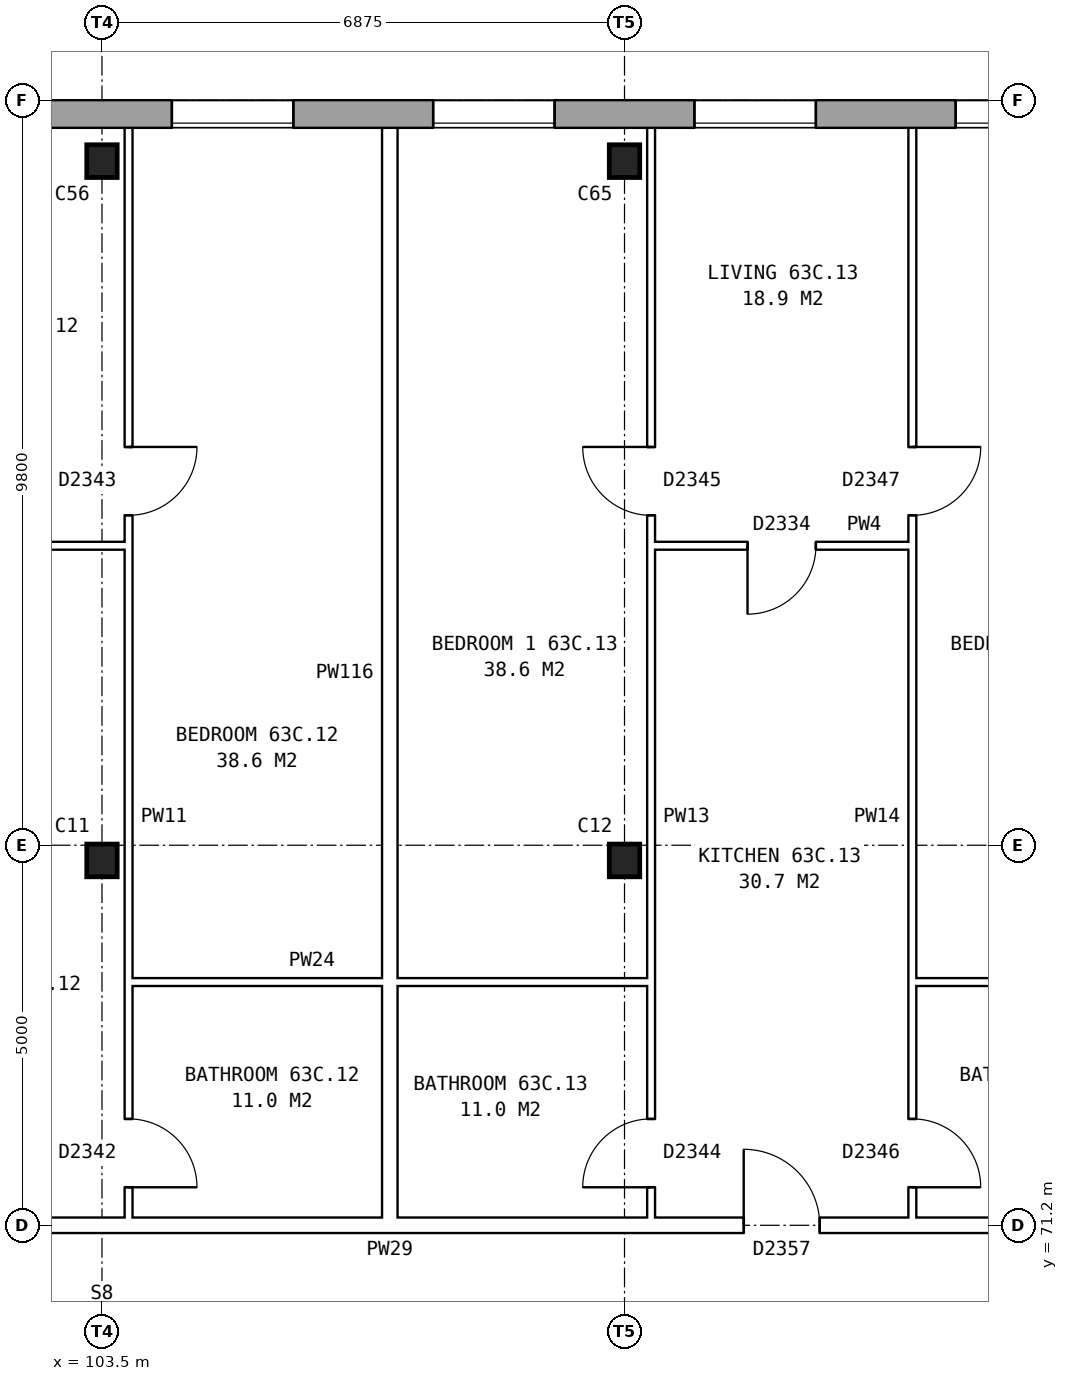
"""IFC4 building model, lengths in metres.
Left out: names, types, materials, properties, quantities, classifications, styles, units other than length and angle.
Written with IfcOpenShell. Run it as: python <this file> out.ifc"""

import sys

from ifc_helpers import new_model, si_unit, direction, frame, frame_2d, origin, origin_2d, place, context, subcontext, project, spatial, rectangle, i_section, extrude, element, fill, save


model = new_model("IFC4")
c1 = context("Model", 3, precision=1e-05, world=origin(), true_north=direction((0.0, 1.0)))
c2 = subcontext(c1, "Body", "Model", "MODEL_VIEW")
j1 = project(units=[si_unit("LENGTHUNIT", "METRE"), si_unit("PLANEANGLEUNIT", "RADIAN")], contexts=[c1])
p1 = place(None, origin())
s1 = spatial("IfcSite", under=j1, at=p1, CompositionType="ELEMENT")
p2 = place(p1, origin())
s2 = spatial("IfcBuilding", under=s1, at=p2, CompositionType="ELEMENT")
p3 = place(p2, frame((0.0, 0.0, 224.5)))
s3 = spatial("IfcBuildingStorey", under=s2, at=p3, CompositionType="ELEMENT", Elevation=224.5)
for number, where, z_axis, x_axis in (
    (1, (103.5, 76.0, 0.0), (0.0, 0.0, 1.0), (1.0, 0.0, 0.0)),
    (2, (110.375, 76.0, 0.0), (0.0, 0.0, 1.0), (1.0, 0.0, 0.0)),
    (3, (103.5, 85.2, 0.0), (0.0, 0.0, 1.0), (1.0, 0.0, 0.0)),
    (4, (110.375, 85.2, 0.0), (0.0, 0.0, 1.0), (1.0, 0.0, 0.0)),
):
    element("IfcColumn", number, at=place(p3, frame(where, z_axis=z_axis, x_axis=x_axis)), inside=s3, PredefinedType="COLUMN", context=c2, shape_type="SweptSolid", body=[
        extrude(i_section(OverallWidth=0.4, OverallDepth=0.43, WebThickness=0.04, FlangeThickness=0.04, at=origin_2d()), origin(), (0.0, 0.0, 1.0), 2.85),
    ])
p4 = place(p3, frame((131.05, 85.82, 0.0), z_axis=(0.0, 0.0, 1.0), x_axis=(-1.0, 0.0, 0.0)))
e5 = element("IfcWall", 5, at=p4, inside=s3, PredefinedType="STANDARD", context=c2, shape_type="SweptSolid", body=[
    extrude(rectangle(XDim=55.1, YDim=0.36, at=frame_2d((27.55, 0.0))), origin(), (0.0, 0.0, 1.0), 2.85),
])
p5 = place(p4, frame((0.969, 0.0, 0.8)))
e6 = element("IfcOpeningElement", 6, at=p5, cuts=e5, PredefinedType="OPENING", context=c2, shape_type="SweptSolid", body=[
    extrude(rectangle(XDim=1.6, YDim=1.8, at=frame_2d((0.8, 0.9))), frame((0.0, 0.19, 0.0), z_axis=(0.0, -1.0, 0.0), x_axis=(1.0, 0.0, 0.0)), (0.0, 0.0, 1.0), 0.38),
])
p6 = place(p4, frame((4.406, 0.0, 0.8)))
e7 = element("IfcOpeningElement", 7, at=p6, cuts=e5, PredefinedType="OPENING", context=c2, shape_type="SweptSolid", body=[
    extrude(rectangle(XDim=1.6, YDim=1.8, at=frame_2d((0.8, 0.9))), frame((0.0, 0.19, 0.0), z_axis=(0.0, -1.0, 0.0), x_axis=(1.0, 0.0, 0.0)), (0.0, 0.0, 1.0), 0.38),
])
p7 = place(p4, frame((7.844, 0.0, 0.8)))
e8 = element("IfcOpeningElement", 8, at=p7, cuts=e5, PredefinedType="OPENING", context=c2, shape_type="SweptSolid", body=[
    extrude(rectangle(XDim=1.6, YDim=1.8, at=frame_2d((0.8, 0.9))), frame((0.0, 0.19, 0.0), z_axis=(0.0, -1.0, 0.0), x_axis=(1.0, 0.0, 0.0)), (0.0, 0.0, 1.0), 0.38),
])
p8 = place(p4, frame((11.281, 0.0, 0.8)))
e9 = element("IfcOpeningElement", 9, at=p8, cuts=e5, PredefinedType="OPENING", context=c2, shape_type="SweptSolid", body=[
    extrude(rectangle(XDim=1.6, YDim=1.8, at=frame_2d((0.8, 0.9))), frame((0.0, 0.19, 0.0), z_axis=(0.0, -1.0, 0.0), x_axis=(1.0, 0.0, 0.0)), (0.0, 0.0, 1.0), 0.38),
])
p9 = place(p4, frame((14.719, 0.0, 0.8)))
e10 = element("IfcOpeningElement", 10, at=p9, cuts=e5, PredefinedType="OPENING", context=c2, shape_type="SweptSolid", body=[
    extrude(rectangle(XDim=1.6, YDim=1.8, at=frame_2d((0.8, 0.9))), frame((0.0, 0.19, 0.0), z_axis=(0.0, -1.0, 0.0), x_axis=(1.0, 0.0, 0.0)), (0.0, 0.0, 1.0), 0.38),
])
p10 = place(p4, frame((18.156, 0.0, 0.8)))
e11 = element("IfcOpeningElement", 11, at=p10, cuts=e5, PredefinedType="OPENING", context=c2, shape_type="SweptSolid", body=[
    extrude(rectangle(XDim=1.6, YDim=1.8, at=frame_2d((0.8, 0.9))), frame((0.0, 0.19, 0.0), z_axis=(0.0, -1.0, 0.0), x_axis=(1.0, 0.0, 0.0)), (0.0, 0.0, 1.0), 0.38),
])
p11 = place(p4, frame((21.594, 0.0, 0.8)))
e12 = element("IfcOpeningElement", 12, at=p11, cuts=e5, PredefinedType="OPENING", context=c2, shape_type="SweptSolid", body=[
    extrude(rectangle(XDim=1.6, YDim=1.8, at=frame_2d((0.8, 0.9))), frame((0.0, 0.19, 0.0), z_axis=(0.0, -1.0, 0.0), x_axis=(1.0, 0.0, 0.0)), (0.0, 0.0, 1.0), 0.38),
])
p12 = place(p4, frame((25.031, 0.0, 0.8)))
e13 = element("IfcOpeningElement", 13, at=p12, cuts=e5, PredefinedType="OPENING", context=c2, shape_type="SweptSolid", body=[
    extrude(rectangle(XDim=1.6, YDim=1.8, at=frame_2d((0.8, 0.9))), frame((0.0, 0.19, 0.0), z_axis=(0.0, -1.0, 0.0), x_axis=(1.0, 0.0, 0.0)), (0.0, 0.0, 1.0), 0.38),
])
p13 = place(p4, frame((28.469, 0.0, 0.8)))
e14 = element("IfcOpeningElement", 14, at=p13, cuts=e5, PredefinedType="OPENING", context=c2, shape_type="SweptSolid", body=[
    extrude(rectangle(XDim=1.6, YDim=1.8, at=frame_2d((0.8, 0.9))), frame((0.0, 0.19, 0.0), z_axis=(0.0, -1.0, 0.0), x_axis=(1.0, 0.0, 0.0)), (0.0, 0.0, 1.0), 0.38),
])
p14 = place(p4, frame((31.906, 0.0, 0.8)))
e15 = element("IfcOpeningElement", 15, at=p14, cuts=e5, PredefinedType="OPENING", context=c2, shape_type="SweptSolid", body=[
    extrude(rectangle(XDim=1.6, YDim=1.8, at=frame_2d((0.8, 0.9))), frame((0.0, 0.19, 0.0), z_axis=(0.0, -1.0, 0.0), x_axis=(1.0, 0.0, 0.0)), (0.0, 0.0, 1.0), 0.38),
])
p15 = place(p4, frame((35.344, 0.0, 0.8)))
e16 = element("IfcOpeningElement", 16, at=p15, cuts=e5, PredefinedType="OPENING", context=c2, shape_type="SweptSolid", body=[
    extrude(rectangle(XDim=1.6, YDim=1.8, at=frame_2d((0.8, 0.9))), frame((0.0, 0.19, 0.0), z_axis=(0.0, -1.0, 0.0), x_axis=(1.0, 0.0, 0.0)), (0.0, 0.0, 1.0), 0.38),
])
p16 = place(p4, frame((38.781, 0.0, 0.8)))
e17 = element("IfcOpeningElement", 17, at=p16, cuts=e5, PredefinedType="OPENING", context=c2, shape_type="SweptSolid", body=[
    extrude(rectangle(XDim=1.6, YDim=1.8, at=frame_2d((0.8, 0.9))), frame((0.0, 0.19, 0.0), z_axis=(0.0, -1.0, 0.0), x_axis=(1.0, 0.0, 0.0)), (0.0, 0.0, 1.0), 0.38),
])
p17 = place(p4, frame((42.219, 0.0, 0.8)))
e18 = element("IfcOpeningElement", 18, at=p17, cuts=e5, PredefinedType="OPENING", context=c2, shape_type="SweptSolid", body=[
    extrude(rectangle(XDim=1.6, YDim=1.8, at=frame_2d((0.8, 0.9))), frame((0.0, 0.19, 0.0), z_axis=(0.0, -1.0, 0.0), x_axis=(1.0, 0.0, 0.0)), (0.0, 0.0, 1.0), 0.38),
])
p18 = place(p4, frame((45.656, 0.0, 0.8)))
e19 = element("IfcOpeningElement", 19, at=p18, cuts=e5, PredefinedType="OPENING", context=c2, shape_type="SweptSolid", body=[
    extrude(rectangle(XDim=1.6, YDim=1.8, at=frame_2d((0.8, 0.9))), frame((0.0, 0.19, 0.0), z_axis=(0.0, -1.0, 0.0), x_axis=(1.0, 0.0, 0.0)), (0.0, 0.0, 1.0), 0.38),
])
p19 = place(p4, frame((49.094, 0.0, 0.8)))
e20 = element("IfcOpeningElement", 20, at=p19, cuts=e5, PredefinedType="OPENING", context=c2, shape_type="SweptSolid", body=[
    extrude(rectangle(XDim=1.6, YDim=1.8, at=frame_2d((0.8, 0.9))), frame((0.0, 0.19, 0.0), z_axis=(0.0, -1.0, 0.0), x_axis=(1.0, 0.0, 0.0)), (0.0, 0.0, 1.0), 0.38),
])
p20 = place(p4, frame((52.531, 0.0, 0.8)))
e21 = element("IfcOpeningElement", 21, at=p20, cuts=e5, PredefinedType="OPENING", context=c2, shape_type="SweptSolid", body=[
    extrude(rectangle(XDim=1.6, YDim=1.8, at=frame_2d((0.8, 0.9))), frame((0.0, 0.19, 0.0), z_axis=(0.0, -1.0, 0.0), x_axis=(1.0, 0.0, 0.0)), (0.0, 0.0, 1.0), 0.38),
])
p21 = place(p3, frame((83.225, 71.2, 0.0), z_axis=(0.0, 0.0, 1.0), x_axis=(1.0, 0.0, 0.0)))
e22 = element("IfcWall", 22, at=p21, inside=s3, PredefinedType="PARTITIONING", context=c2, shape_type="SweptSolid", body=[
    extrude(rectangle(XDim=41.25, YDim=0.2, at=frame_2d((20.625, 0.0))), origin(), (0.0, 0.0, 1.0), 2.85),
])
p22 = place(p21, frame((4.656, 0.0, 0.0)))
e23 = element("IfcOpeningElement", 23, at=p22, cuts=e22, PredefinedType="OPENING", context=c2, shape_type="SweptSolid", body=[
    extrude(rectangle(XDim=1.0, YDim=2.1, at=frame_2d((0.5, 1.05))), frame((0.0, 0.11, 0.0), z_axis=(0.0, -1.0, 0.0), x_axis=(1.0, 0.0, 0.0)), (0.0, 0.0, 1.0), 0.22),
])
p23 = place(p21, frame((11.531, 0.0, 0.0)))
e24 = element("IfcOpeningElement", 24, at=p23, cuts=e22, PredefinedType="OPENING", context=c2, shape_type="SweptSolid", body=[
    extrude(rectangle(XDim=1.0, YDim=2.1, at=frame_2d((0.5, 1.05))), frame((0.0, 0.11, 0.0), z_axis=(0.0, -1.0, 0.0), x_axis=(1.0, 0.0, 0.0)), (0.0, 0.0, 1.0), 0.22),
])
p24 = place(p21, frame((18.406, 0.0, 0.0)))
e25 = element("IfcOpeningElement", 25, at=p24, cuts=e22, PredefinedType="OPENING", context=c2, shape_type="SweptSolid", body=[
    extrude(rectangle(XDim=1.0, YDim=2.1, at=frame_2d((0.5, 1.05))), frame((0.0, 0.11, 0.0), z_axis=(0.0, -1.0, 0.0), x_axis=(1.0, 0.0, 0.0)), (0.0, 0.0, 1.0), 0.22),
])
p25 = place(p21, frame((28.719, 0.0, 0.0)))
e26 = element("IfcOpeningElement", 26, at=p25, cuts=e22, PredefinedType="OPENING", context=c2, shape_type="SweptSolid", body=[
    extrude(rectangle(XDim=1.0, YDim=2.1, at=frame_2d((0.5, 1.05))), frame((0.0, 0.11, 0.0), z_axis=(0.0, -1.0, 0.0), x_axis=(1.0, 0.0, 0.0)), (0.0, 0.0, 1.0), 0.22),
])
p26 = place(p21, frame((35.594, 0.0, 0.0)))
e27 = element("IfcOpeningElement", 27, at=p26, cuts=e22, PredefinedType="OPENING", context=c2, shape_type="SweptSolid", body=[
    extrude(rectangle(XDim=1.0, YDim=2.1, at=frame_2d((0.5, 1.05))), frame((0.0, 0.11, 0.0), z_axis=(0.0, -1.0, 0.0), x_axis=(1.0, 0.0, 0.0)), (0.0, 0.0, 1.0), 0.22),
])
p27 = place(p3, frame((103.85, 74.4, 0.0), z_axis=(0.0, 0.0, 1.0), x_axis=(1.0, 0.0, 0.0)))
e28 = element("IfcWall", 28, at=p27, inside=s3, PredefinedType="PARTITIONING", context=c2, shape_type="SweptSolid", body=[
    extrude(rectangle(XDim=6.875, YDim=0.1, at=frame_2d((3.438, 0.0))), origin(), (0.0, 0.0, 1.0), 2.85),
])
p28 = place(p3, frame((114.162, 74.4, 0.0), z_axis=(0.0, 0.0, 1.0), x_axis=(1.0, 0.0, 0.0)))
e29 = element("IfcWall", 29, at=p28, inside=s3, PredefinedType="PARTITIONING", context=c2, shape_type="SweptSolid", body=[
    extrude(rectangle(XDim=3.338, YDim=0.1, at=frame_2d((1.669, 0.0))), origin(), (0.0, 0.0, 1.0), 2.85),
])
p29 = place(p3, frame((100.512, 80.14, 0.0), z_axis=(0.0, 0.0, 1.0), x_axis=(1.0, 0.0, 0.0)))
e30 = element("IfcWall", 30, at=p29, inside=s3, PredefinedType="PARTITIONING", context=c2, shape_type="SweptSolid", body=[
    extrude(rectangle(XDim=3.338, YDim=0.1, at=frame_2d((1.669, 0.0))), origin(), (0.0, 0.0, 1.0), 2.85),
])
p30 = place(p29, frame((1.219, 0.0, 0.0)))
e31 = element("IfcOpeningElement", 31, at=p30, cuts=e30, PredefinedType="OPENING", context=c2, shape_type="SweptSolid", body=[
    extrude(rectangle(XDim=0.9, YDim=2.1, at=frame_2d((0.45, 1.05))), frame((0.0, 0.06, 0.0), z_axis=(0.0, -1.0, 0.0), x_axis=(1.0, 0.0, 0.0)), (0.0, 0.0, 1.0), 0.12),
])
p31 = place(p3, frame((110.725, 80.14, 0.0), z_axis=(0.0, 0.0, 1.0), x_axis=(1.0, 0.0, 0.0)))
e32 = element("IfcWall", 32, at=p31, inside=s3, PredefinedType="PARTITIONING", context=c2, shape_type="SweptSolid", body=[
    extrude(rectangle(XDim=3.437, YDim=0.1, at=frame_2d((1.719, 0.0))), origin(), (0.0, 0.0, 1.0), 2.85),
])
p32 = place(p31, frame((1.269, 0.0, 0.0)))
e33 = element("IfcOpeningElement", 33, at=p32, cuts=e32, PredefinedType="OPENING", context=c2, shape_type="SweptSolid", body=[
    extrude(rectangle(XDim=0.9, YDim=2.1, at=frame_2d((0.45, 1.05))), frame((0.0, 0.06, 0.0), z_axis=(0.0, -1.0, 0.0), x_axis=(1.0, 0.0, 0.0)), (0.0, 0.0, 1.0), 0.12),
])
p33 = place(p3, frame((103.85, 71.3, 0.0), z_axis=(0.0, 0.0, 1.0), x_axis=(0.0, 1.0, 0.0)))
e34 = element("IfcWall", 34, at=p33, inside=s3, PredefinedType="PARTITIONING", context=c2, shape_type="SweptSolid", body=[
    extrude(rectangle(XDim=14.34, YDim=0.1, at=frame_2d((7.17, 0.0))), origin(), (0.0, 0.0, 1.0), 2.85),
])
p34 = place(p33, frame((9.24, 0.0, 0.0)))
e35 = element("IfcOpeningElement", 35, at=p34, cuts=e34, PredefinedType="OPENING", context=c2, shape_type="SweptSolid", body=[
    extrude(rectangle(XDim=0.9, YDim=2.1, at=frame_2d((0.45, 1.05))), frame((0.0, 0.06, 0.0), z_axis=(0.0, -1.0, 0.0), x_axis=(1.0, 0.0, 0.0)), (0.0, 0.0, 1.0), 0.12),
])
p35 = place(p33, frame((0.4, 0.0, 0.0)))
e36 = element("IfcOpeningElement", 36, at=p35, cuts=e34, PredefinedType="OPENING", context=c2, shape_type="SweptSolid", body=[
    extrude(rectangle(XDim=0.9, YDim=2.1, at=frame_2d((0.45, 1.05))), frame((0.0, 0.06, 0.0), z_axis=(0.0, -1.0, 0.0), x_axis=(1.0, 0.0, 0.0)), (0.0, 0.0, 1.0), 0.12),
])
p36 = place(p3, frame((107.287, 71.3, 0.0), z_axis=(0.0, 0.0, 1.0), x_axis=(0.0, 1.0, 0.0)))
e37 = element("IfcWall", 37, at=p36, inside=s3, PredefinedType="PARTITIONING", context=c2, shape_type="SweptSolid", body=[
    extrude(rectangle(XDim=14.34, YDim=0.2, at=frame_2d((7.17, 0.0))), origin(), (0.0, 0.0, 1.0), 2.85),
])
p37 = place(p3, frame((110.725, 71.3, 0.0), z_axis=(0.0, 0.0, 1.0), x_axis=(0.0, 1.0, 0.0)))
e38 = element("IfcWall", 38, at=p37, inside=s3, PredefinedType="PARTITIONING", context=c2, shape_type="SweptSolid", body=[
    extrude(rectangle(XDim=14.34, YDim=0.1, at=frame_2d((7.17, 0.0))), origin(), (0.0, 0.0, 1.0), 2.85),
])
p38 = place(p37, frame((9.24, 0.0, 0.0)))
e39 = element("IfcOpeningElement", 39, at=p38, cuts=e38, PredefinedType="OPENING", context=c2, shape_type="SweptSolid", body=[
    extrude(rectangle(XDim=0.9, YDim=2.1, at=frame_2d((0.45, 1.05))), frame((0.0, 0.06, 0.0), z_axis=(0.0, -1.0, 0.0), x_axis=(1.0, 0.0, 0.0)), (0.0, 0.0, 1.0), 0.12),
])
p39 = place(p37, frame((0.4, 0.0, 0.0)))
e40 = element("IfcOpeningElement", 40, at=p39, cuts=e38, PredefinedType="OPENING", context=c2, shape_type="SweptSolid", body=[
    extrude(rectangle(XDim=0.9, YDim=2.1, at=frame_2d((0.45, 1.05))), frame((0.0, 0.06, 0.0), z_axis=(0.0, -1.0, 0.0), x_axis=(1.0, 0.0, 0.0)), (0.0, 0.0, 1.0), 0.12),
])
p40 = place(p3, frame((114.162, 71.3, 0.0), z_axis=(0.0, 0.0, 1.0), x_axis=(0.0, 1.0, 0.0)))
e41 = element("IfcWall", 41, at=p40, inside=s3, PredefinedType="PARTITIONING", context=c2, shape_type="SweptSolid", body=[
    extrude(rectangle(XDim=14.34, YDim=0.1, at=frame_2d((7.17, 0.0))), origin(), (0.0, 0.0, 1.0), 2.85),
])
p41 = place(p40, frame((9.24, 0.0, 0.0)))
e42 = element("IfcOpeningElement", 42, at=p41, cuts=e41, PredefinedType="OPENING", context=c2, shape_type="SweptSolid", body=[
    extrude(rectangle(XDim=0.9, YDim=2.1, at=frame_2d((0.45, 1.05))), frame((0.0, 0.06, 0.0), z_axis=(0.0, -1.0, 0.0), x_axis=(1.0, 0.0, 0.0)), (0.0, 0.0, 1.0), 0.12),
])
p42 = place(p40, frame((0.4, 0.0, 0.0)))
e43 = element("IfcOpeningElement", 43, at=p42, cuts=e41, PredefinedType="OPENING", context=c2, shape_type="SweptSolid", body=[
    extrude(rectangle(XDim=0.9, YDim=2.1, at=frame_2d((0.45, 1.05))), frame((0.0, 0.06, 0.0), z_axis=(0.0, -1.0, 0.0), x_axis=(1.0, 0.0, 0.0)), (0.0, 0.0, 1.0), 0.12),
])
p43 = place(p9, origin())
e44 = element("IfcWindow", 44, at=p43, inside=s3, PartitioningType="SINGLE_PANEL", PredefinedType="WINDOW", context=c2, shape_type="SweptSolid", body=[
    extrude(rectangle(XDim=1.6, YDim=1.8, at=frame_2d((0.8, 0.9))), frame((0.0, 0.15, 0.0), z_axis=(0.0, -1.0, 0.0), x_axis=(1.0, 0.0, 0.0)), (0.0, 0.0, 1.0), 0.06),
])
fill(e10, e44)
p44 = place(p10, origin())
e45 = element("IfcWindow", 45, at=p44, inside=s3, PartitioningType="SINGLE_PANEL", PredefinedType="WINDOW", context=c2, shape_type="SweptSolid", body=[
    extrude(rectangle(XDim=1.6, YDim=1.8, at=frame_2d((0.8, 0.9))), frame((0.0, 0.15, 0.0), z_axis=(0.0, -1.0, 0.0), x_axis=(1.0, 0.0, 0.0)), (0.0, 0.0, 1.0), 0.06),
])
fill(e11, e45)
p45 = place(p11, origin())
e46 = element("IfcWindow", 46, at=p45, inside=s3, PartitioningType="SINGLE_PANEL", PredefinedType="WINDOW", context=c2, shape_type="SweptSolid", body=[
    extrude(rectangle(XDim=1.6, YDim=1.8, at=frame_2d((0.8, 0.9))), frame((0.0, 0.15, 0.0), z_axis=(0.0, -1.0, 0.0), x_axis=(1.0, 0.0, 0.0)), (0.0, 0.0, 1.0), 0.06),
])
fill(e12, e46)
p46 = place(p12, origin())
e47 = element("IfcWindow", 47, at=p46, inside=s3, PartitioningType="SINGLE_PANEL", PredefinedType="WINDOW", context=c2, shape_type="SweptSolid", body=[
    extrude(rectangle(XDim=1.6, YDim=1.8, at=frame_2d((0.8, 0.9))), frame((0.0, 0.15, 0.0), z_axis=(0.0, -1.0, 0.0), x_axis=(1.0, 0.0, 0.0)), (0.0, 0.0, 1.0), 0.06),
])
fill(e13, e47)
p47 = place(p34, frame((0.9, 0.0, 0.0), z_axis=(0.0, 0.0, 1.0), x_axis=(-1.0, 0.0, 0.0)))
e48 = element("IfcDoor", 48, at=p47, inside=s3, OperationType="SINGLE_SWING_LEFT", PredefinedType="DOOR", context=c2, shape_type="SweptSolid", body=[
    extrude(rectangle(XDim=0.9, YDim=2.1, at=frame_2d((0.45, 1.05))), frame((0.0, 0.025, 0.0), z_axis=(0.0, -1.0, 0.0), x_axis=(1.0, 0.0, 0.0)), (0.0, 0.0, 1.0), 0.05),
])
fill(e35, e48)
p48 = place(p35, frame((0.9, 0.0, 0.0), z_axis=(0.0, 0.0, 1.0), x_axis=(-1.0, 0.0, 0.0)))
e49 = element("IfcDoor", 49, at=p48, inside=s3, OperationType="SINGLE_SWING_RIGHT", PredefinedType="DOOR", context=c2, shape_type="SweptSolid", body=[
    extrude(rectangle(XDim=0.9, YDim=2.1, at=frame_2d((0.45, 1.05))), frame((0.0, 0.025, 0.0), z_axis=(0.0, -1.0, 0.0), x_axis=(1.0, 0.0, 0.0)), (0.0, 0.0, 1.0), 0.05),
])
fill(e36, e49)
p49 = place(p38, origin())
e50 = element("IfcDoor", 50, at=p49, inside=s3, OperationType="SINGLE_SWING_RIGHT", PredefinedType="DOOR", context=c2, shape_type="SweptSolid", body=[
    extrude(rectangle(XDim=0.9, YDim=2.1, at=frame_2d((0.45, 1.05))), frame((0.0, 0.025, 0.0), z_axis=(0.0, -1.0, 0.0), x_axis=(1.0, 0.0, 0.0)), (0.0, 0.0, 1.0), 0.05),
])
fill(e39, e50)
p50 = place(p41, frame((0.9, 0.0, 0.0), z_axis=(0.0, 0.0, 1.0), x_axis=(-1.0, 0.0, 0.0)))
e51 = element("IfcDoor", 51, at=p50, inside=s3, OperationType="SINGLE_SWING_LEFT", PredefinedType="DOOR", context=c2, shape_type="SweptSolid", body=[
    extrude(rectangle(XDim=0.9, YDim=2.1, at=frame_2d((0.45, 1.05))), frame((0.0, 0.025, 0.0), z_axis=(0.0, -1.0, 0.0), x_axis=(1.0, 0.0, 0.0)), (0.0, 0.0, 1.0), 0.05),
])
fill(e42, e51)
p51 = place(p25, origin())
e52 = element("IfcDoor", 52, at=p51, inside=s3, OperationType="SINGLE_SWING_LEFT", PredefinedType="DOOR", context=c2, shape_type="SweptSolid", body=[
    extrude(rectangle(XDim=1.0, YDim=2.1, at=frame_2d((0.5, 1.05))), frame((0.0, 0.025, 0.0), z_axis=(0.0, -1.0, 0.0), x_axis=(1.0, 0.0, 0.0)), (0.0, 0.0, 1.0), 0.05),
])
fill(e26, e52)
p52 = place(p32, frame((0.9, 0.0, 0.0), z_axis=(0.0, 0.0, 1.0), x_axis=(-1.0, 0.0, 0.0)))
e53 = element("IfcDoor", 53, at=p52, inside=s3, OperationType="SINGLE_SWING_RIGHT", PredefinedType="DOOR", context=c2, shape_type="SweptSolid", body=[
    extrude(rectangle(XDim=0.9, YDim=2.1, at=frame_2d((0.45, 1.05))), frame((0.0, 0.025, 0.0), z_axis=(0.0, -1.0, 0.0), x_axis=(1.0, 0.0, 0.0)), (0.0, 0.0, 1.0), 0.05),
])
fill(e33, e53)
p53 = place(p39, origin())
e54 = element("IfcDoor", 54, at=p53, inside=s3, OperationType="SINGLE_SWING_LEFT", PredefinedType="DOOR", context=c2, shape_type="SweptSolid", body=[
    extrude(rectangle(XDim=0.9, YDim=2.1, at=frame_2d((0.45, 1.05))), frame((0.0, 0.025, 0.0), z_axis=(0.0, -1.0, 0.0), x_axis=(1.0, 0.0, 0.0)), (0.0, 0.0, 1.0), 0.05),
])
fill(e40, e54)
p54 = place(p42, frame((0.9, 0.0, 0.0), z_axis=(0.0, 0.0, 1.0), x_axis=(-1.0, 0.0, 0.0)))
e55 = element("IfcDoor", 55, at=p54, inside=s3, OperationType="SINGLE_SWING_RIGHT", PredefinedType="DOOR", context=c2, shape_type="SweptSolid", body=[
    extrude(rectangle(XDim=0.9, YDim=2.1, at=frame_2d((0.45, 1.05))), frame((0.0, 0.025, 0.0), z_axis=(0.0, -1.0, 0.0), x_axis=(1.0, 0.0, 0.0)), (0.0, 0.0, 1.0), 0.05),
])
fill(e43, e55)
save(model, sys.argv[1])
